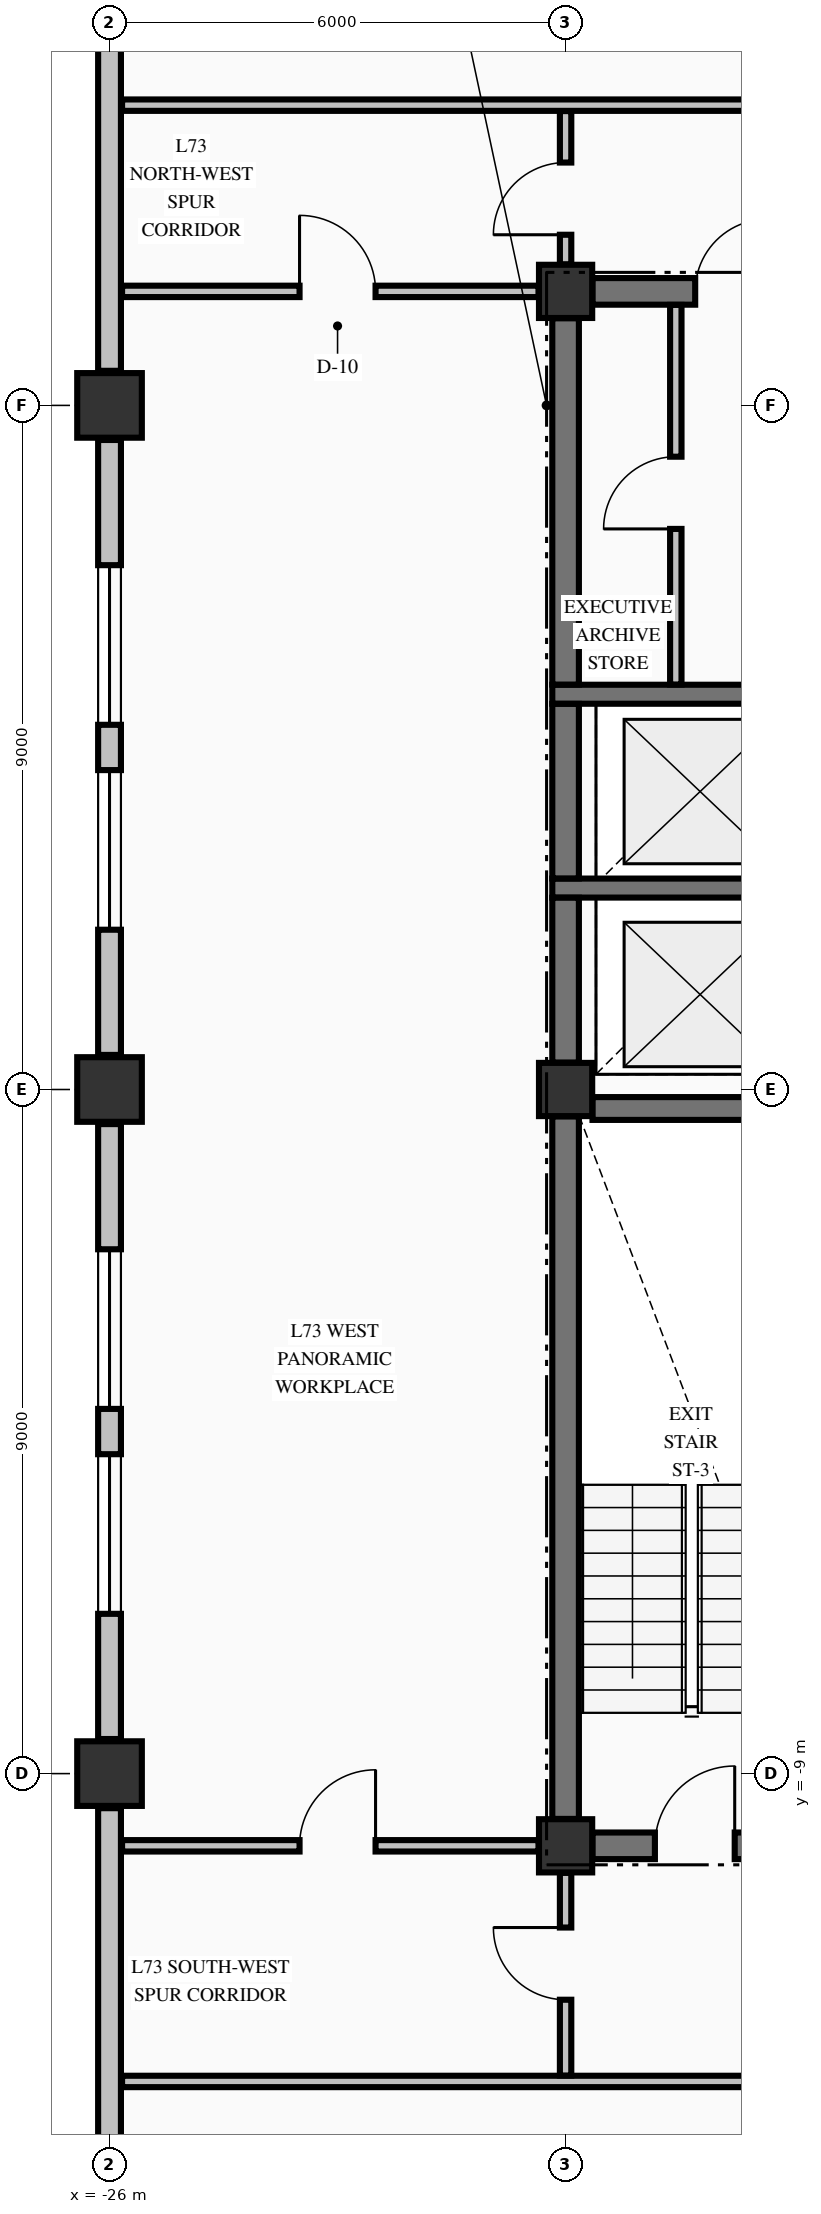
"""IFC4 building model, lengths in metres.
Left out: names, types, materials, properties, quantities, classifications, styles, units other than length and angle.
Written with IfcOpenShell. Run it as: python <this file> out.ifc"""

import sys

from ifc_helpers import new_model, si_unit, direction, frame, frame_2d, origin, origin_2d, place, context, subcontext, project, spatial, rectangle, extrude, element, fill, save


model = new_model("IFC4")
c1 = context("Model", 3, precision=1e-05, world=origin(), true_north=direction((0.0, 1.0)))
c2 = subcontext(c1, "Body", "Model", "MODEL_VIEW")
j1 = project(units=[si_unit("LENGTHUNIT", "METRE"), si_unit("PLANEANGLEUNIT", "RADIAN")], contexts=[c1])
p1 = place(None, origin())
s1 = spatial("IfcSite", under=j1, at=p1, CompositionType="ELEMENT")
p2 = place(p1, origin())
s2 = spatial("IfcBuilding", under=s1, at=p2, CompositionType="ELEMENT")
p3 = place(p2, frame((0.0, 0.0, 274.32)))
s3 = spatial("IfcBuildingStorey", under=s2, at=p3, CompositionType="ELEMENT", Elevation=274.32)
for number, where, z_axis, x_axis in (
    (1, (-26.0, -9.0, -0.25), (0.0, 0.0, 1.0), (1.0, 0.0, 0.0)),
    (2, (-26.0, 0.0, -0.25), (0.0, 0.0, 1.0), (1.0, 0.0, 0.0)),
    (3, (-26.0, 9.0, -0.25), (0.0, 0.0, 1.0), (1.0, 0.0, 0.0)),
):
    element("IfcColumn", number, at=place(p3, frame(where, z_axis=z_axis, x_axis=x_axis)), inside=s3, PredefinedType="COLUMN", context=c2, shape_type="SweptSolid", body=[
        extrude(rectangle(XDim=0.85, YDim=0.85, at=origin_2d()), origin(), (0.0, 0.0, 1.0), 3.565),
    ])
for number, where, z_axis, x_axis in (
    (4, (-20.0, -9.95, -0.25), (0.0, 0.0, 1.0), (1.0, 0.0, 0.0)),
    (5, (-20.0, 10.5, -0.25), (0.0, 0.0, 1.0), (1.0, 0.0, 0.0)),
    (6, (-20.0, 0.0, -0.25), (0.0, 0.0, 1.0), (1.0, 0.0, 0.0)),
):
    element("IfcColumn", number, at=place(p3, frame(where, z_axis=z_axis, x_axis=x_axis)), inside=s3, PredefinedType="COLUMN", context=c2, shape_type="SweptSolid", body=[
        extrude(rectangle(XDim=0.7, YDim=0.7, at=origin_2d()), origin(), (0.0, 0.0, 1.0), 3.565),
    ])
p4 = place(p3, frame((-26.0, -9.455, 0.0), z_axis=(0.0, 0.0, 1.0), x_axis=(0.0, -1.0, 0.0)))
e7 = element("IfcWall", 7, at=p4, inside=s3, PredefinedType="STANDARD", context=c2, shape_type="SweptSolid", body=[
    extrude(rectangle(XDim=8.09, YDim=0.3, at=frame_2d((4.045, 0.0))), origin(), (0.0, 0.0, 1.0), 2.707),
])
p5 = place(p3, frame((-26.0, -0.455, 0.0), z_axis=(0.0, 0.0, 1.0), x_axis=(0.0, -1.0, 0.0)))
e8 = element("IfcWall", 8, at=p5, inside=s3, PredefinedType="STANDARD", context=c2, shape_type="SweptSolid", body=[
    extrude(rectangle(XDim=8.09, YDim=0.3, at=frame_2d((4.045, 0.0))), origin(), (0.0, 0.0, 1.0), 2.707),
])
p6 = place(p5, frame((1.647, 0.0, 0.7)))
e9 = element("IfcOpeningElement", 9, at=p6, cuts=e8, PredefinedType="OPENING", context=c2, shape_type="SweptSolid", body=[
    extrude(rectangle(XDim=2.1, YDim=1.5, at=frame_2d((1.05, 0.75))), frame((0.0, 0.16, 0.0), z_axis=(0.0, -1.0, 0.0), x_axis=(1.0, 0.0, 0.0)), (0.0, 0.0, 1.0), 0.32),
])
p7 = place(p5, frame((4.343, 0.0, 0.7)))
e10 = element("IfcOpeningElement", 10, at=p7, cuts=e8, PredefinedType="OPENING", context=c2, shape_type="SweptSolid", body=[
    extrude(rectangle(XDim=2.1, YDim=1.5, at=frame_2d((1.05, 0.75))), frame((0.0, 0.16, 0.0), z_axis=(0.0, -1.0, 0.0), x_axis=(1.0, 0.0, 0.0)), (0.0, 0.0, 1.0), 0.32),
])
p8 = place(p3, frame((-26.0, 8.545, 0.0), z_axis=(0.0, 0.0, 1.0), x_axis=(0.0, -1.0, 0.0)))
e11 = element("IfcWall", 11, at=p8, inside=s3, PredefinedType="STANDARD", context=c2, shape_type="SweptSolid", body=[
    extrude(rectangle(XDim=8.09, YDim=0.3, at=frame_2d((4.045, 0.0))), origin(), (0.0, 0.0, 1.0), 2.707),
])
p9 = place(p8, frame((1.647, 0.0, 0.7)))
e12 = element("IfcOpeningElement", 12, at=p9, cuts=e11, PredefinedType="OPENING", context=c2, shape_type="SweptSolid", body=[
    extrude(rectangle(XDim=2.1, YDim=1.5, at=frame_2d((1.05, 0.75))), frame((0.0, 0.16, 0.0), z_axis=(0.0, -1.0, 0.0), x_axis=(1.0, 0.0, 0.0)), (0.0, 0.0, 1.0), 0.32),
])
p10 = place(p8, frame((4.343, 0.0, 0.7)))
e13 = element("IfcOpeningElement", 13, at=p10, cuts=e11, PredefinedType="OPENING", context=c2, shape_type="SweptSolid", body=[
    extrude(rectangle(XDim=2.1, YDim=1.5, at=frame_2d((1.05, 0.75))), frame((0.0, 0.16, 0.0), z_axis=(0.0, -1.0, 0.0), x_axis=(1.0, 0.0, 0.0)), (0.0, 0.0, 1.0), 0.32),
])
p11 = place(p3, frame((-26.0, 17.545, 0.0), z_axis=(0.0, 0.0, 1.0), x_axis=(0.0, -1.0, 0.0)))
e14 = element("IfcWall", 14, at=p11, inside=s3, PredefinedType="STANDARD", context=c2, shape_type="SweptSolid", body=[
    extrude(rectangle(XDim=8.09, YDim=0.3, at=frame_2d((4.045, 0.0))), origin(), (0.0, 0.0, 1.0), 2.707),
])
p12 = place(p3, frame((-19.646, -9.95, 0.0), z_axis=(0.0, 0.0, 1.0), x_axis=(1.0, 0.0, 0.0)))
e15 = element("IfcWall", 15, at=p12, inside=s3, PredefinedType="SHEAR", context=c2, shape_type="SweptSolid", body=[
    extrude(rectangle(XDim=4.946, YDim=0.35, at=frame_2d((2.473, 0.0))), origin(), (0.0, 0.0, 1.0), 3.315),
])
p13 = place(p12, frame((0.821, 0.0, 0.0)))
e16 = element("IfcOpeningElement", 16, at=p13, cuts=e15, PredefinedType="OPENING", context=c2, shape_type="SweptSolid", body=[
    extrude(rectangle(XDim=1.05, YDim=2.15, at=frame_2d((0.525, 1.075))), frame((0.0, 0.185, 0.0), z_axis=(0.0, -1.0, 0.0), x_axis=(1.0, 0.0, 0.0)), (0.0, 0.0, 1.0), 0.37),
])
p14 = place(p3, frame((-19.646, -0.25, 0.0), z_axis=(0.0, 0.0, 1.0), x_axis=(1.0, 0.0, 0.0)))
e17 = element("IfcWall", 17, at=p14, inside=s3, PredefinedType="SHEAR", context=c2, shape_type="SweptSolid", body=[
    extrude(rectangle(XDim=8.292, YDim=0.3, at=frame_2d((4.146, 0.0))), origin(), (0.0, 0.0, 1.0), 3.315),
])
p15 = place(p14, frame((5.946, 0.0, 0.0)))
e18 = element("IfcOpeningElement", 18, at=p15, cuts=e17, PredefinedType="OPENING", context=c2, shape_type="SweptSolid", body=[
    extrude(rectangle(XDim=1.1, YDim=2.15, at=frame_2d((0.55, 1.075))), frame((0.0, 0.16, 0.0), z_axis=(0.0, -1.0, 0.0), x_axis=(1.0, 0.0, 0.0)), (0.0, 0.0, 1.0), 0.32),
])
for number, where, z_axis, x_axis in (
    (19, (-20.175, 2.65, 0.0), (0.0, 0.0, 1.0), (1.0, 0.0, 0.0)),
    (20, (-20.175, 5.2, 0.0), (0.0, 0.0, 1.0), (1.0, 0.0, 0.0)),
):
    element("IfcWall", number, at=place(p3, frame(where, z_axis=z_axis, x_axis=x_axis)), inside=s3, PredefinedType="SOLIDWALL", context=c2, shape_type="SweptSolid", body=[
        extrude(rectangle(XDim=3.2, YDim=0.25, at=frame_2d((1.6, 0.0))), origin(), (0.0, 0.0, 1.0), 3.315),
    ])
p16 = place(p3, frame((-19.646, 10.5, 0.0), z_axis=(0.0, 0.0, 1.0), x_axis=(1.0, 0.0, 0.0)))
e21 = element("IfcWall", 21, at=p16, inside=s3, PredefinedType="SHEAR", context=c2, shape_type="SweptSolid", body=[
    extrude(rectangle(XDim=4.946, YDim=0.35, at=frame_2d((2.473, 0.0))), origin(), (0.0, 0.0, 1.0), 3.315),
])
p17 = place(p16, frame((3.196, 0.0, 0.0)))
e22 = element("IfcOpeningElement", 22, at=p17, cuts=e21, PredefinedType="OPENING", context=c2, shape_type="SweptSolid", body=[
    extrude(rectangle(XDim=1.1, YDim=2.15, at=frame_2d((0.55, 1.075))), frame((0.0, 0.185, 0.0), z_axis=(0.0, -1.0, 0.0), x_axis=(1.0, 0.0, 0.0)), (0.0, 0.0, 1.0), 0.37),
])
p18 = place(p16, frame((1.351, 0.0, 0.0)))
e23 = element("IfcOpeningElement", 23, at=p18, cuts=e21, PredefinedType="OPENING", context=c2, shape_type="SweptSolid", body=[
    extrude(rectangle(XDim=0.95, YDim=2.15, at=frame_2d((0.475, 1.075))), frame((0.0, 0.185, 0.0), z_axis=(0.0, -1.0, 0.0), x_axis=(1.0, 0.0, 0.0)), (0.0, 0.0, 1.0), 0.37),
])
p19 = place(p3, frame((-25.835, -13.05, 0.0), z_axis=(0.0, 0.0, 1.0), x_axis=(1.0, 0.0, 0.0)))
e24 = element("IfcWall", 24, at=p19, inside=s3, PredefinedType="PARTITIONING", context=c2, shape_type="SweptSolid", body=[
    extrude(rectangle(XDim=45.91, YDim=0.15, at=frame_2d((22.955, 0.0))), origin(), (0.0, 0.0, 1.0), 3.315),
])
p20 = place(p19, frame((26.685, 0.0, 0.0)))
e25 = element("IfcOpeningElement", 25, at=p20, cuts=e24, PredefinedType="OPENING", context=c2, shape_type="SweptSolid", body=[
    extrude(rectangle(XDim=1.1, YDim=2.15, at=frame_2d((0.55, 1.075))), frame((0.0, 0.085, 0.0), z_axis=(0.0, -1.0, 0.0), x_axis=(1.0, 0.0, 0.0)), (0.0, 0.0, 1.0), 0.17),
])
p21 = place(p19, frame((21.16, 0.0, 0.0)))
e26 = element("IfcOpeningElement", 26, at=p21, cuts=e24, PredefinedType="OPENING", context=c2, shape_type="SweptSolid", body=[
    extrude(rectangle(XDim=1.05, YDim=2.15, at=frame_2d((0.525, 1.075))), frame((0.0, 0.085, 0.0), z_axis=(0.0, -1.0, 0.0), x_axis=(1.0, 0.0, 0.0)), (0.0, 0.0, 1.0), 0.17),
])
p22 = place(p19, frame((34.31, 0.0, 0.0)))
e27 = element("IfcOpeningElement", 27, at=p22, cuts=e24, PredefinedType="OPENING", context=c2, shape_type="SweptSolid", body=[
    extrude(rectangle(XDim=1.05, YDim=2.15, at=frame_2d((0.525, 1.075))), frame((0.0, 0.085, 0.0), z_axis=(0.0, -1.0, 0.0), x_axis=(1.0, 0.0, 0.0)), (0.0, 0.0, 1.0), 0.17),
])
p23 = place(p3, frame((-25.835, -9.95, 0.0), z_axis=(0.0, 0.0, 1.0), x_axis=(1.0, 0.0, 0.0)))
e28 = element("IfcWall", 28, at=p23, inside=s3, PredefinedType="PARTITIONING", context=c2, shape_type="SweptSolid", body=[
    extrude(rectangle(XDim=5.479, YDim=0.15, at=frame_2d((2.74, 0.0))), origin(), (0.0, 0.0, 1.0), 3.315),
])
p24 = place(p23, frame((2.335, 0.0, 0.0)))
e29 = element("IfcOpeningElement", 29, at=p24, cuts=e28, PredefinedType="OPENING", context=c2, shape_type="SweptSolid", body=[
    extrude(rectangle(XDim=1.0, YDim=2.15, at=frame_2d((0.5, 1.075))), frame((0.0, 0.085, 0.0), z_axis=(0.0, -1.0, 0.0), x_axis=(1.0, 0.0, 0.0)), (0.0, 0.0, 1.0), 0.17),
])
p25 = place(p3, frame((-25.835, 10.5, 0.0), z_axis=(0.0, 0.0, 1.0), x_axis=(1.0, 0.0, 0.0)))
e30 = element("IfcWall", 30, at=p25, inside=s3, PredefinedType="PARTITIONING", context=c2, shape_type="SweptSolid", body=[
    extrude(rectangle(XDim=5.479, YDim=0.15, at=frame_2d((2.74, 0.0))), origin(), (0.0, 0.0, 1.0), 3.315),
])
p26 = place(p25, frame((2.335, 0.0, 0.0)))
e31 = element("IfcOpeningElement", 31, at=p26, cuts=e30, PredefinedType="OPENING", context=c2, shape_type="SweptSolid", body=[
    extrude(rectangle(XDim=1.0, YDim=2.15, at=frame_2d((0.5, 1.075))), frame((0.0, 0.085, 0.0), z_axis=(0.0, -1.0, 0.0), x_axis=(1.0, 0.0, 0.0)), (0.0, 0.0, 1.0), 0.17),
])
p27 = place(p3, frame((-25.835, 12.95, 0.0), z_axis=(0.0, 0.0, 1.0), x_axis=(1.0, 0.0, 0.0)))
e32 = element("IfcWall", 32, at=p27, inside=s3, PredefinedType="PARTITIONING", context=c2, shape_type="SweptSolid", body=[
    extrude(rectangle(XDim=45.91, YDim=0.15, at=frame_2d((22.955, 0.0))), origin(), (0.0, 0.0, 1.0), 3.315),
])
p28 = place(p27, frame((16.38, 0.0, 0.0)))
e33 = element("IfcOpeningElement", 33, at=p28, cuts=e32, PredefinedType="OPENING", context=c2, shape_type="SweptSolid", body=[
    extrude(rectangle(XDim=1.05, YDim=2.15, at=frame_2d((0.525, 1.075))), frame((0.0, 0.085, 0.0), z_axis=(0.0, -1.0, 0.0), x_axis=(1.0, 0.0, 0.0)), (0.0, 0.0, 1.0), 0.17),
])
p29 = place(p27, frame((34.03, 0.0, 0.0)))
e34 = element("IfcOpeningElement", 34, at=p29, cuts=e32, PredefinedType="OPENING", context=c2, shape_type="SweptSolid", body=[
    extrude(rectangle(XDim=1.05, YDim=2.15, at=frame_2d((0.525, 1.075))), frame((0.0, 0.085, 0.0), z_axis=(0.0, -1.0, 0.0), x_axis=(1.0, 0.0, 0.0)), (0.0, 0.0, 1.0), 0.17),
])
p30 = place(p3, frame((-20.0, -9.596, 0.0), z_axis=(0.0, 0.0, 1.0), x_axis=(0.0, 1.0, 0.0)))
e35 = element("IfcWall", 35, at=p30, inside=s3, PredefinedType="SHEAR", context=c2, shape_type="SweptSolid", body=[
    extrude(rectangle(XDim=9.242, YDim=0.35, at=frame_2d((4.621, 0.0))), origin(), (0.0, 0.0, 1.0), 3.315),
])
p31 = place(p3, frame((-20.0, 0.354, 0.0), z_axis=(0.0, 0.0, 1.0), x_axis=(0.0, 1.0, 0.0)))
e36 = element("IfcWall", 36, at=p31, inside=s3, PredefinedType="SHEAR", context=c2, shape_type="SweptSolid", body=[
    extrude(rectangle(XDim=2.169, YDim=0.35, at=frame_2d((1.084, 0.0))), origin(), (0.0, 0.0, 1.0), 3.315),
])
p32 = place(p3, frame((-20.0, 2.777, 0.0), z_axis=(0.0, 0.0, 1.0), x_axis=(0.0, 1.0, 0.0)))
e37 = element("IfcWall", 37, at=p32, inside=s3, PredefinedType="SHEAR", context=c2, shape_type="SweptSolid", body=[
    extrude(rectangle(XDim=2.296, YDim=0.35, at=frame_2d((1.148, 0.0))), origin(), (0.0, 0.0, 1.0), 3.315),
])
p33 = place(p3, frame((-20.0, 5.327, 0.0), z_axis=(0.0, 0.0, 1.0), x_axis=(0.0, 1.0, 0.0)))
e38 = element("IfcWall", 38, at=p33, inside=s3, PredefinedType="SHEAR", context=c2, shape_type="SweptSolid", body=[
    extrude(rectangle(XDim=4.819, YDim=0.35, at=frame_2d((2.41, 0.0))), origin(), (0.0, 0.0, 1.0), 3.315),
])
p34 = place(p3, frame((-20.0, -12.972, 0.0), z_axis=(0.0, 0.0, 1.0), x_axis=(0.0, 1.0, 0.0)))
e39 = element("IfcWall", 39, at=p34, inside=s3, PredefinedType="PARTITIONING", context=c2, shape_type="SweptSolid", body=[
    extrude(rectangle(XDim=2.666, YDim=0.15, at=frame_2d((1.333, 0.0))), origin(), (0.0, 0.0, 1.0), 3.315),
])
p35 = place(p34, frame((0.997, 0.0, 0.0)))
e40 = element("IfcOpeningElement", 40, at=p35, cuts=e39, PredefinedType="OPENING", context=c2, shape_type="SweptSolid", body=[
    extrude(rectangle(XDim=0.95, YDim=2.15, at=frame_2d((0.475, 1.075))), frame((0.0, 0.085, 0.0), z_axis=(0.0, -1.0, 0.0), x_axis=(1.0, 0.0, 0.0)), (0.0, 0.0, 1.0), 0.17),
])
p36 = place(p3, frame((-20.0, 10.856, 0.0), z_axis=(0.0, 0.0, 1.0), x_axis=(0.0, 1.0, 0.0)))
e41 = element("IfcWall", 41, at=p36, inside=s3, PredefinedType="PARTITIONING", context=c2, shape_type="SweptSolid", body=[
    extrude(rectangle(XDim=2.016, YDim=0.15, at=frame_2d((1.008, 0.0))), origin(), (0.0, 0.0, 1.0), 3.315),
])
p37 = place(p36, frame((0.389, 0.0, 0.0)))
e42 = element("IfcOpeningElement", 42, at=p37, cuts=e41, PredefinedType="OPENING", context=c2, shape_type="SweptSolid", body=[
    extrude(rectangle(XDim=0.95, YDim=2.15, at=frame_2d((0.475, 1.075))), frame((0.0, 0.085, 0.0), z_axis=(0.0, -1.0, 0.0), x_axis=(1.0, 0.0, 0.0)), (0.0, 0.0, 1.0), 0.17),
])
p38 = place(p3, frame((-18.55, 5.328, 0.0), z_axis=(0.0, 0.0, 1.0), x_axis=(0.0, 1.0, 0.0)))
e43 = element("IfcWall", 43, at=p38, inside=s3, PredefinedType="PARTITIONING", context=c2, shape_type="SweptSolid", body=[
    extrude(rectangle(XDim=4.994, YDim=0.15, at=frame_2d((2.497, 0.0))), origin(), (0.0, 0.0, 1.0), 3.315),
])
p39 = place(p38, frame((2.047, 0.0, 0.0)))
e44 = element("IfcOpeningElement", 44, at=p39, cuts=e43, PredefinedType="OPENING", context=c2, shape_type="SweptSolid", body=[
    extrude(rectangle(XDim=0.95, YDim=2.15, at=frame_2d((0.475, 1.075))), frame((0.0, 0.085, 0.0), z_axis=(0.0, -1.0, 0.0), x_axis=(1.0, 0.0, 0.0)), (0.0, 0.0, 1.0), 0.17),
])
p40 = place(p6, origin())
e45 = element("IfcWindow", 45, at=p40, inside=s3, PartitioningType="SINGLE_PANEL", PredefinedType="WINDOW", context=c2, shape_type="SweptSolid", body=[
    extrude(rectangle(XDim=2.1, YDim=1.5, at=frame_2d((1.05, 0.75))), frame((0.0, 0.03, 0.0), z_axis=(0.0, -1.0, 0.0), x_axis=(1.0, 0.0, 0.0)), (0.0, 0.0, 1.0), 0.06),
])
fill(e9, e45)
p41 = place(p7, origin())
e46 = element("IfcWindow", 46, at=p41, inside=s3, PartitioningType="SINGLE_PANEL", PredefinedType="WINDOW", context=c2, shape_type="SweptSolid", body=[
    extrude(rectangle(XDim=2.1, YDim=1.5, at=frame_2d((1.05, 0.75))), frame((0.0, 0.03, 0.0), z_axis=(0.0, -1.0, 0.0), x_axis=(1.0, 0.0, 0.0)), (0.0, 0.0, 1.0), 0.06),
])
fill(e10, e46)
p42 = place(p9, origin())
e47 = element("IfcWindow", 47, at=p42, inside=s3, PartitioningType="SINGLE_PANEL", PredefinedType="WINDOW", context=c2, shape_type="SweptSolid", body=[
    extrude(rectangle(XDim=2.1, YDim=1.5, at=frame_2d((1.05, 0.75))), frame((0.0, 0.03, 0.0), z_axis=(0.0, -1.0, 0.0), x_axis=(1.0, 0.0, 0.0)), (0.0, 0.0, 1.0), 0.06),
])
fill(e12, e47)
p43 = place(p10, origin())
e48 = element("IfcWindow", 48, at=p43, inside=s3, PartitioningType="SINGLE_PANEL", PredefinedType="WINDOW", context=c2, shape_type="SweptSolid", body=[
    extrude(rectangle(XDim=2.1, YDim=1.5, at=frame_2d((1.05, 0.75))), frame((0.0, 0.03, 0.0), z_axis=(0.0, -1.0, 0.0), x_axis=(1.0, 0.0, 0.0)), (0.0, 0.0, 1.0), 0.06),
])
fill(e13, e48)
p44 = place(p13, origin())
e49 = element("IfcDoor", 49, at=p44, inside=s3, OperationType="SINGLE_SWING_RIGHT", PredefinedType="DOOR", context=c2, shape_type="SweptSolid", body=[
    extrude(rectangle(XDim=1.05, YDim=2.15, at=frame_2d((0.525, 1.075))), frame((0.0, 0.025, 0.0), z_axis=(0.0, -1.0, 0.0), x_axis=(1.0, 0.0, 0.0)), (0.0, 0.0, 1.0), 0.05),
])
fill(e16, e49)
p45 = place(p18, origin())
e50 = element("IfcDoor", 50, at=p45, inside=s3, OperationType="SINGLE_SWING_RIGHT", PredefinedType="DOOR", context=c2, shape_type="SweptSolid", body=[
    extrude(rectangle(XDim=0.95, YDim=2.15, at=frame_2d((0.475, 1.075))), frame((0.0, 0.025, 0.0), z_axis=(0.0, -1.0, 0.0), x_axis=(1.0, 0.0, 0.0)), (0.0, 0.0, 1.0), 0.05),
])
fill(e23, e50)
p46 = place(p39, origin())
e51 = element("IfcDoor", 51, at=p46, inside=s3, OperationType="SINGLE_SWING_LEFT", PredefinedType="DOOR", context=c2, shape_type="SweptSolid", body=[
    extrude(rectangle(XDim=0.95, YDim=2.15, at=frame_2d((0.475, 1.075))), frame((0.0, 0.025, 0.0), z_axis=(0.0, -1.0, 0.0), x_axis=(1.0, 0.0, 0.0)), (0.0, 0.0, 1.0), 0.05),
])
fill(e44, e51)
p47 = place(p37, origin())
e52 = element("IfcDoor", 52, at=p47, inside=s3, OperationType="SINGLE_SWING_LEFT", PredefinedType="DOOR", context=c2, shape_type="SweptSolid", body=[
    extrude(rectangle(XDim=0.95, YDim=2.15, at=frame_2d((0.475, 1.075))), frame((0.0, 0.025, 0.0), z_axis=(0.0, -1.0, 0.0), x_axis=(1.0, 0.0, 0.0)), (0.0, 0.0, 1.0), 0.05),
])
fill(e42, e52)
p48 = place(p35, origin())
e53 = element("IfcDoor", 53, at=p48, inside=s3, OperationType="SINGLE_SWING_RIGHT", PredefinedType="DOOR", context=c2, shape_type="SweptSolid", body=[
    extrude(rectangle(XDim=0.95, YDim=2.15, at=frame_2d((0.475, 1.075))), frame((0.0, 0.025, 0.0), z_axis=(0.0, -1.0, 0.0), x_axis=(1.0, 0.0, 0.0)), (0.0, 0.0, 1.0), 0.05),
])
fill(e40, e53)
p49 = place(p26, origin())
e54 = element("IfcDoor", 54, at=p49, inside=s3, OperationType="SINGLE_SWING_LEFT", PredefinedType="DOOR", context=c2, shape_type="SweptSolid", body=[
    extrude(rectangle(XDim=1.0, YDim=2.15, at=frame_2d((0.5, 1.075))), frame((0.0, 0.025, 0.0), z_axis=(0.0, -1.0, 0.0), x_axis=(1.0, 0.0, 0.0)), (0.0, 0.0, 1.0), 0.05),
])
fill(e31, e54)
p50 = place(p24, origin())
e55 = element("IfcDoor", 55, at=p50, inside=s3, OperationType="SINGLE_SWING_RIGHT", PredefinedType="DOOR", context=c2, shape_type="SweptSolid", body=[
    extrude(rectangle(XDim=1.0, YDim=2.15, at=frame_2d((0.5, 1.075))), frame((0.0, 0.025, 0.0), z_axis=(0.0, -1.0, 0.0), x_axis=(1.0, 0.0, 0.0)), (0.0, 0.0, 1.0), 0.05),
])
fill(e29, e55)
save(model, sys.argv[1])
